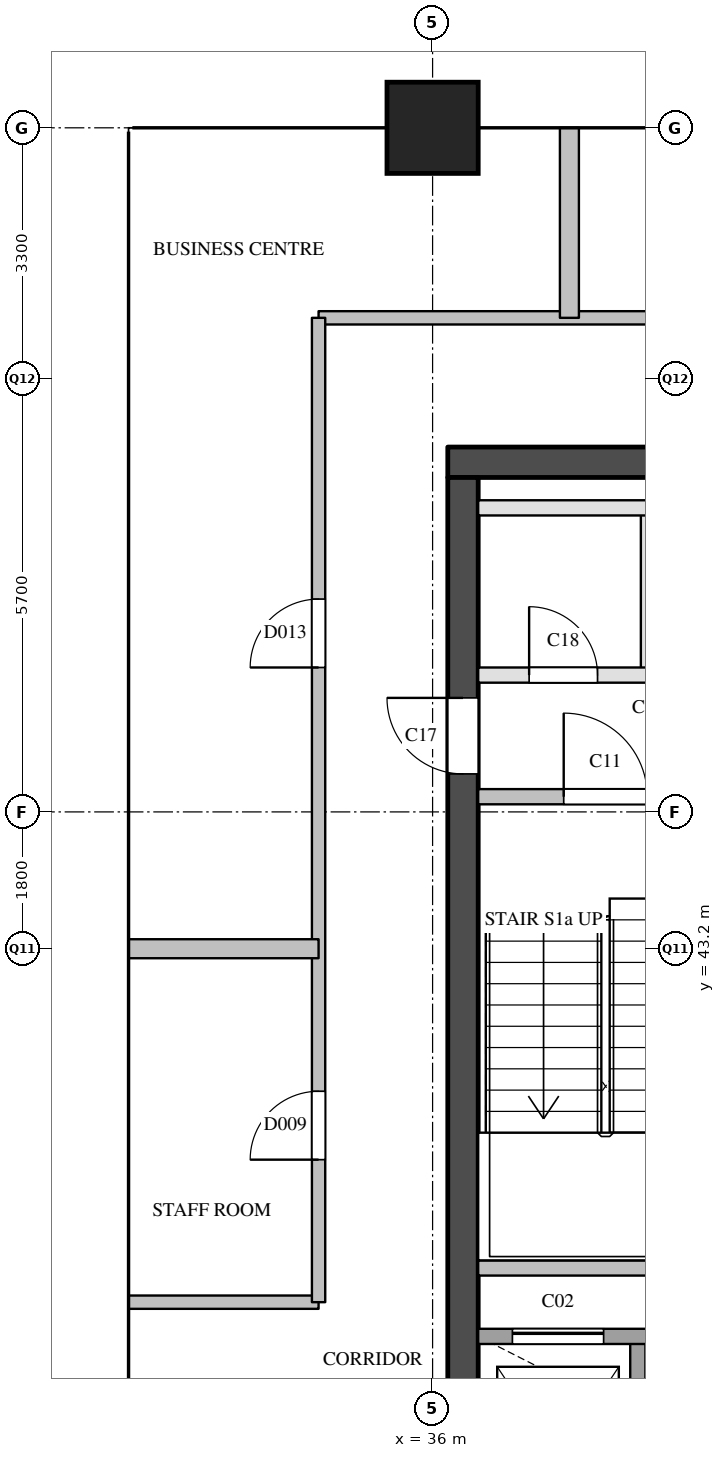
"""IFC4 building model, lengths in metres.
Left out: names, types, materials, properties, quantities, classifications, styles, units other than length and angle.
Written with IfcOpenShell. Run it as: python <this file> out.ifc"""

import sys

from ifc_helpers import new_model, si_unit, direction, frame, frame_2d, origin, origin_2d, place, context, subcontext, project, spatial, rectangle, extrude, element, fill, save


model = new_model("IFC4")
c1 = context("Model", 3, precision=1e-05, world=origin(), true_north=direction((0.0, 1.0)))
c2 = subcontext(c1, "Body", "Model", "MODEL_VIEW")
j1 = project(units=[si_unit("LENGTHUNIT", "METRE"), si_unit("PLANEANGLEUNIT", "RADIAN")], contexts=[c1])
p1 = place(None, origin())
s1 = spatial("IfcSite", under=j1, at=p1, CompositionType="ELEMENT")
p2 = place(p1, origin())
s2 = spatial("IfcBuilding", under=s1, at=p2, CompositionType="ELEMENT")
p3 = place(p2, frame((0.0, 0.0, 207.2)))
s3 = spatial("IfcBuildingStorey", under=s2, at=p3, CompositionType="ELEMENT", Elevation=207.2)
p4 = place(p3, frame((36.0, 54.0, 0.0), z_axis=(0.0, 0.0, 1.0), x_axis=(1.0, 0.0, 0.0)))
e1 = element("IfcColumn", 1, at=p4, inside=s3, PredefinedType="COLUMN", context=c2, shape_type="SweptSolid", body=[
    extrude(rectangle(XDim=1.2, YDim=1.2, at=origin_2d()), origin(), (0.0, 0.0, 1.0), 3.9),
])
p5 = place(p3, frame((36.2, 49.6, 0.0), z_axis=(0.0, 0.0, 1.0), x_axis=(1.0, 0.0, 0.0)))
e2 = element("IfcWall", 2, at=p5, inside=s3, PredefinedType="SHEAR", context=c2, shape_type="SweptSolid", body=[
    extrude(rectangle(XDim=12.0, YDim=0.4, at=frame_2d((6.0, 0.0))), origin(), (0.0, 0.0, 1.0), 3.6),
])
p6 = place(p3, frame((36.4, 29.1, 0.0), z_axis=(0.0, 0.0, 1.0), x_axis=(0.0, 1.0, 0.0)))
e3 = element("IfcWall", 3, at=p6, inside=s3, PredefinedType="SHEAR", context=c2, shape_type="SweptSolid", body=[
    extrude(rectangle(XDim=20.3, YDim=0.4, at=frame_2d((10.15, 0.0))), origin(), (0.0, 0.0, 1.0), 3.6),
])
p7 = place(p6, frame((3.6, 0.0, 0.0)))
e4 = element("IfcOpeningElement", 4, at=p7, cuts=e3, PredefinedType="OPENING", context=c2, shape_type="SweptSolid", body=[
    extrude(rectangle(XDim=1.8, YDim=2.1, at=frame_2d((0.9, 1.05))), frame((0.0, 0.21, 0.0), z_axis=(0.0, -1.0, 0.0), x_axis=(1.0, 0.0, 0.0)), (0.0, 0.0, 1.0), 0.42),
])
p8 = place(p6, frame((16.4, 0.0, 0.0)))
e5 = element("IfcOpeningElement", 5, at=p8, cuts=e3, PredefinedType="OPENING", context=c2, shape_type="SweptSolid", body=[
    extrude(rectangle(XDim=1.0, YDim=2.1, at=frame_2d((0.5, 1.05))), frame((0.0, 0.21, 0.0), z_axis=(0.0, -1.0, 0.0), x_axis=(1.0, 0.0, 0.0)), (0.0, 0.0, 1.0), 0.42),
])
p9 = place(p3, frame((38.7, 34.9, 0.0), z_axis=(0.0, 0.0, 1.0), x_axis=(0.0, 1.0, 0.0)))
e6 = element("IfcWall", 6, at=p9, inside=s3, PredefinedType="SOLIDWALL", context=c2, shape_type="SweptSolid", body=[
    extrude(rectangle(XDim=3.2, YDim=0.2, at=frame_2d((1.6, 0.0))), origin(), (0.0, 0.0, 1.0), 3.6),
])
p10 = place(p3, frame((38.84, 46.8, 0.0), z_axis=(0.0, 0.0, 1.0), x_axis=(0.0, 1.0, 0.0)))
e7 = element("IfcWall", 7, at=p10, inside=s3, PredefinedType="PARTITIONING", context=c2, shape_type="SweptSolid", body=[
    extrude(rectangle(XDim=2.2, YDim=0.2, at=frame_2d((1.1, 0.0))), origin(), (0.0, 0.0, 1.0), 3.6),
])
p11 = place(p3, frame((36.6, 38.1, 0.0), z_axis=(0.0, 0.0, 1.0), x_axis=(1.0, 0.0, 0.0)))
e8 = element("IfcWall", 8, at=p11, inside=s3, PredefinedType="SOLIDWALL", context=c2, shape_type="SweptSolid", body=[
    extrude(rectangle(XDim=6.7, YDim=0.2, at=frame_2d((3.35, 0.0))), origin(), (0.0, 0.0, 1.0), 3.6),
])
p12 = place(p11, frame((0.45, 0.0, 0.0)))
e9 = element("IfcOpeningElement", 9, at=p12, cuts=e8, PredefinedType="OPENING", context=c2, shape_type="SweptSolid", body=[
    extrude(rectangle(XDim=1.2, YDim=2.1, at=frame_2d((0.6, 1.05))), frame((0.0, 0.11, 0.0), z_axis=(0.0, -1.0, 0.0), x_axis=(1.0, 0.0, 0.0)), (0.0, 0.0, 1.0), 0.22),
])
p13 = place(p11, frame((2.55, 0.0, 0.0)))
e10 = element("IfcOpeningElement", 10, at=p13, cuts=e8, PredefinedType="OPENING", context=c2, shape_type="SweptSolid", body=[
    extrude(rectangle(XDim=1.2, YDim=2.1, at=frame_2d((0.6, 1.05))), frame((0.0, 0.11, 0.0), z_axis=(0.0, -1.0, 0.0), x_axis=(1.0, 0.0, 0.0)), (0.0, 0.0, 1.0), 0.22),
])
p14 = place(p11, frame((4.65, 0.0, 0.0)))
e11 = element("IfcOpeningElement", 11, at=p14, cuts=e8, PredefinedType="OPENING", context=c2, shape_type="SweptSolid", body=[
    extrude(rectangle(XDim=1.2, YDim=2.1, at=frame_2d((0.6, 1.05))), frame((0.0, 0.11, 0.0), z_axis=(0.0, -1.0, 0.0), x_axis=(1.0, 0.0, 0.0)), (0.0, 0.0, 1.0), 0.22),
])
p15 = place(p3, frame((36.6, 39.0, 0.0), z_axis=(0.0, 0.0, 1.0), x_axis=(1.0, 0.0, 0.0)))
e12 = element("IfcWall", 12, at=p15, inside=s3, PredefinedType="SOLIDWALL", context=c2, shape_type="SweptSolid", body=[
    extrude(rectangle(XDim=3.25, YDim=0.2, at=frame_2d((1.625, 0.0))), origin(), (0.0, 0.0, 1.0), 3.6),
])
p16 = place(p3, frame((36.6, 45.2, 0.0), z_axis=(0.0, 0.0, 1.0), x_axis=(1.0, 0.0, 0.0)))
e13 = element("IfcWall", 13, at=p16, inside=s3, PredefinedType="SOLIDWALL", context=c2, shape_type="SweptSolid", body=[
    extrude(rectangle(XDim=10.05, YDim=0.2, at=frame_2d((5.025, 0.0))), origin(), (0.0, 0.0, 1.0), 3.6),
])
p17 = place(p16, frame((1.125, 0.0, 0.0)))
e14 = element("IfcOpeningElement", 14, at=p17, cuts=e13, PredefinedType="OPENING", context=c2, shape_type="SweptSolid", body=[
    extrude(rectangle(XDim=1.1, YDim=2.1, at=frame_2d((0.55, 1.05))), frame((0.0, 0.11, 0.0), z_axis=(0.0, -1.0, 0.0), x_axis=(1.0, 0.0, 0.0)), (0.0, 0.0, 1.0), 0.22),
])
p18 = place(p16, frame((4.475, 0.0, 0.0)))
e15 = element("IfcOpeningElement", 15, at=p18, cuts=e13, PredefinedType="OPENING", context=c2, shape_type="SweptSolid", body=[
    extrude(rectangle(XDim=1.1, YDim=2.1, at=frame_2d((0.55, 1.05))), frame((0.0, 0.11, 0.0), z_axis=(0.0, -1.0, 0.0), x_axis=(1.0, 0.0, 0.0)), (0.0, 0.0, 1.0), 0.22),
])
p19 = place(p16, frame((7.825, 0.0, 0.0)))
e16 = element("IfcOpeningElement", 16, at=p19, cuts=e13, PredefinedType="OPENING", context=c2, shape_type="SweptSolid", body=[
    extrude(rectangle(XDim=1.1, YDim=2.1, at=frame_2d((0.55, 1.05))), frame((0.0, 0.11, 0.0), z_axis=(0.0, -1.0, 0.0), x_axis=(1.0, 0.0, 0.0)), (0.0, 0.0, 1.0), 0.22),
])
p20 = place(p3, frame((36.6, 46.8, 0.0), z_axis=(0.0, 0.0, 1.0), x_axis=(1.0, 0.0, 0.0)))
e17 = element("IfcWall", 17, at=p20, inside=s3, PredefinedType="PARTITIONING", context=c2, shape_type="SweptSolid", body=[
    extrude(rectangle(XDim=11.2, YDim=0.2, at=frame_2d((5.6, 0.0))), origin(), (0.0, 0.0, 1.0), 3.6),
])
p21 = place(p20, frame((0.67, 0.0, 0.0)))
e18 = element("IfcOpeningElement", 18, at=p21, cuts=e17, PredefinedType="OPENING", context=c2, shape_type="SweptSolid", body=[
    extrude(rectangle(XDim=0.9, YDim=2.1, at=frame_2d((0.45, 1.05))), frame((0.0, 0.11, 0.0), z_axis=(0.0, -1.0, 0.0), x_axis=(1.0, 0.0, 0.0)), (0.0, 0.0, 1.0), 0.22),
])
p22 = place(p20, frame((6.27, 0.0, 0.0)))
e19 = element("IfcOpeningElement", 19, at=p22, cuts=e17, PredefinedType="OPENING", context=c2, shape_type="SweptSolid", body=[
    extrude(rectangle(XDim=0.9, YDim=2.1, at=frame_2d((0.45, 1.05))), frame((0.0, 0.11, 0.0), z_axis=(0.0, -1.0, 0.0), x_axis=(1.0, 0.0, 0.0)), (0.0, 0.0, 1.0), 0.22),
])
p23 = place(p3, frame((36.6, 49.0, 0.0), z_axis=(0.0, 0.0, 1.0), x_axis=(1.0, 0.0, 0.0)))
e20 = element("IfcWall", 20, at=p23, inside=s3, PredefinedType="PARTITIONING", context=c2, shape_type="SweptSolid", body=[
    extrude(rectangle(XDim=11.2, YDim=0.2, at=frame_2d((5.6, 0.0))), origin(), (0.0, 0.0, 1.0), 3.6),
])
p24 = place(p3, frame((32.0, 38.55, 0.0), z_axis=(0.0, 0.0, 1.0), x_axis=(1.0, 0.0, 0.0)))
e21 = element("IfcWall", 21, at=p24, inside=s3, PredefinedType="PARTITIONING", context=c2, shape_type="SweptSolid", body=[
    extrude(rectangle(XDim=2.5, YDim=0.175, at=frame_2d((1.25, 0.0))), origin(), (0.0, 0.0, 1.0), 3.6),
])
p25 = place(p3, frame((34.5, 51.5, 0.0), z_axis=(0.0, 0.0, 1.0), x_axis=(1.0, 0.0, 0.0)))
e22 = element("IfcWall", 22, at=p25, inside=s3, PredefinedType="PARTITIONING", context=c2, shape_type="SweptSolid", body=[
    extrude(rectangle(XDim=15.4, YDim=0.175, at=frame_2d((7.7, 0.0))), origin(), (0.0, 0.0, 1.0), 3.6),
])
p26 = place(p25, frame((8.25, 0.0, 0.0)))
e23 = element("IfcOpeningElement", 23, at=p26, cuts=e22, PredefinedType="OPENING", context=c2, shape_type="SweptSolid", body=[
    extrude(rectangle(XDim=0.9, YDim=2.1, at=frame_2d((0.45, 1.05))), frame((0.0, 0.097, 0.0), z_axis=(0.0, -1.0, 0.0), x_axis=(1.0, 0.0, 0.0)), (0.0, 0.0, 1.0), 0.195),
])
p27 = place(p3, frame((34.5, 38.55, 0.0), z_axis=(0.0, 0.0, 1.0), x_axis=(0.0, 1.0, 0.0)))
e24 = element("IfcWall", 24, at=p27, inside=s3, PredefinedType="PARTITIONING", context=c2, shape_type="SweptSolid", body=[
    extrude(rectangle(XDim=12.95, YDim=0.175, at=frame_2d((6.475, 0.0))), origin(), (0.0, 0.0, 1.0), 3.6),
])
p28 = place(p27, frame((1.875, 0.0, 0.0)))
e25 = element("IfcOpeningElement", 25, at=p28, cuts=e24, PredefinedType="OPENING", context=c2, shape_type="SweptSolid", body=[
    extrude(rectangle(XDim=0.9, YDim=2.1, at=frame_2d((0.45, 1.05))), frame((0.0, 0.097, 0.0), z_axis=(0.0, -1.0, 0.0), x_axis=(1.0, 0.0, 0.0)), (0.0, 0.0, 1.0), 0.195),
])
p29 = place(p27, frame((8.35, 0.0, 0.0)))
e26 = element("IfcOpeningElement", 26, at=p29, cuts=e24, PredefinedType="OPENING", context=c2, shape_type="SweptSolid", body=[
    extrude(rectangle(XDim=0.9, YDim=2.1, at=frame_2d((0.45, 1.05))), frame((0.0, 0.097, 0.0), z_axis=(0.0, -1.0, 0.0), x_axis=(1.0, 0.0, 0.0)), (0.0, 0.0, 1.0), 0.195),
])
p30 = place(p3, frame((32.0, 43.2, 0.0), z_axis=(0.0, 0.0, 1.0), x_axis=(1.0, 0.0, 0.0)))
e27 = element("IfcWall", 27, at=p30, inside=s3, PredefinedType="PARTITIONING", context=c2, shape_type="SweptSolid", body=[
    extrude(rectangle(XDim=2.5, YDim=0.25, at=frame_2d((1.25, 0.0))), origin(), (0.0, 0.0, 1.0), 3.6),
])
p31 = place(p3, frame((37.8, 51.5, 0.0), z_axis=(0.0, 0.0, 1.0), x_axis=(0.0, 1.0, 0.0)))
e28 = element("IfcWall", 28, at=p31, inside=s3, PredefinedType="PARTITIONING", context=c2, shape_type="SweptSolid", body=[
    extrude(rectangle(XDim=2.5, YDim=0.25, at=frame_2d((1.25, 0.0))), origin(), (0.0, 0.0, 1.0), 2.6),
])
p32 = place(p12, origin())
e29 = element("IfcDoor", 29, at=p32, inside=s3, OperationType="SLIDING_TO_LEFT", PredefinedType="DOOR", context=c2, shape_type="SweptSolid", body=[
    extrude(rectangle(XDim=1.2, YDim=2.1, at=frame_2d((0.6, 1.05))), frame((0.0, 0.025, 0.0), z_axis=(0.0, -1.0, 0.0), x_axis=(1.0, 0.0, 0.0)), (0.0, 0.0, 1.0), 0.05),
])
fill(e9, e29)
p33 = place(p17, origin())
e30 = element("IfcDoor", 30, at=p33, inside=s3, OperationType="SINGLE_SWING_LEFT", PredefinedType="DOOR", context=c2, shape_type="SweptSolid", body=[
    extrude(rectangle(XDim=1.1, YDim=2.1, at=frame_2d((0.55, 1.05))), frame((0.0, 0.025, 0.0), z_axis=(0.0, -1.0, 0.0), x_axis=(1.0, 0.0, 0.0)), (0.0, 0.0, 1.0), 0.05),
])
fill(e14, e30)
p34 = place(p8, origin())
e31 = element("IfcDoor", 31, at=p34, inside=s3, OperationType="SINGLE_SWING_RIGHT", PredefinedType="DOOR", context=c2, shape_type="SweptSolid", body=[
    extrude(rectangle(XDim=1.0, YDim=2.1, at=frame_2d((0.5, 1.05))), frame((0.0, 0.025, 0.0), z_axis=(0.0, -1.0, 0.0), x_axis=(1.0, 0.0, 0.0)), (0.0, 0.0, 1.0), 0.05),
])
fill(e5, e31)
p35 = place(p21, origin())
e32 = element("IfcDoor", 32, at=p35, inside=s3, OperationType="SINGLE_SWING_LEFT", PredefinedType="DOOR", context=c2, shape_type="SweptSolid", body=[
    extrude(rectangle(XDim=0.9, YDim=2.1, at=frame_2d((0.45, 1.05))), frame((0.0, 0.025, 0.0), z_axis=(0.0, -1.0, 0.0), x_axis=(1.0, 0.0, 0.0)), (0.0, 0.0, 1.0), 0.05),
])
fill(e18, e32)
p36 = place(p28, origin())
e33 = element("IfcDoor", 33, at=p36, inside=s3, OperationType="SINGLE_SWING_LEFT", PredefinedType="DOOR", context=c2, shape_type="SweptSolid", body=[
    extrude(rectangle(XDim=0.9, YDim=2.1, at=frame_2d((0.45, 1.05))), frame((0.0, 0.025, 0.0), z_axis=(0.0, -1.0, 0.0), x_axis=(1.0, 0.0, 0.0)), (0.0, 0.0, 1.0), 0.05),
])
fill(e25, e33)
p37 = place(p29, origin())
e34 = element("IfcDoor", 34, at=p37, inside=s3, OperationType="SINGLE_SWING_LEFT", PredefinedType="DOOR", context=c2, shape_type="SweptSolid", body=[
    extrude(rectangle(XDim=0.9, YDim=2.1, at=frame_2d((0.45, 1.05))), frame((0.0, 0.025, 0.0), z_axis=(0.0, -1.0, 0.0), x_axis=(1.0, 0.0, 0.0)), (0.0, 0.0, 1.0), 0.05),
])
fill(e26, e34)
save(model, sys.argv[1])
